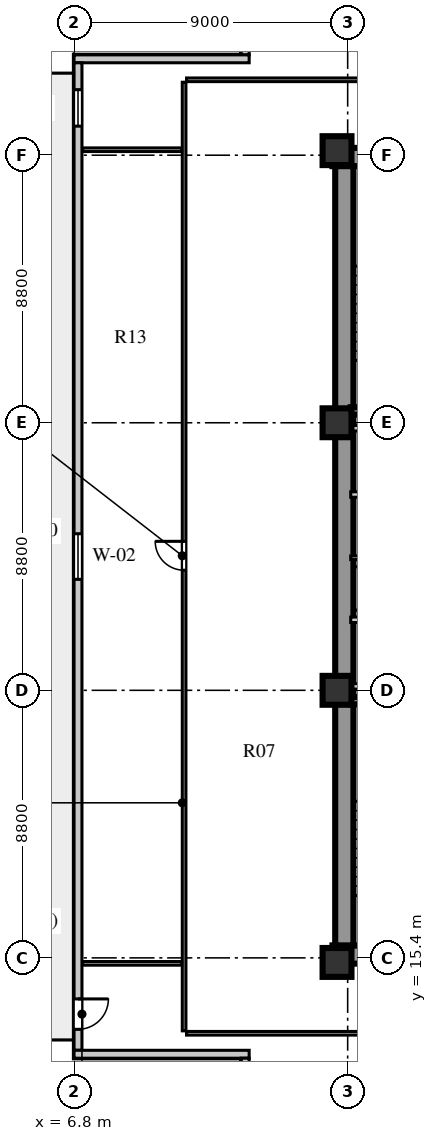
"""IFC4 building model, lengths in metres.
Left out: names, types, materials, properties, quantities, classifications, styles, units other than length and angle.
Written with IfcOpenShell. Run it as: python <this file> out.ifc"""

import sys

from ifc_helpers import new_model, si_unit, direction, frame, frame_2d, origin, origin_2d, place, context, subcontext, project, spatial, rectangle, extrude, element, fill, save


model = new_model("IFC4")
c1 = context("Model", 3, precision=1e-05, world=origin(), true_north=direction((0.0, 1.0)))
c2 = subcontext(c1, "Body", "Model", "MODEL_VIEW")
j1 = project(units=[si_unit("LENGTHUNIT", "METRE"), si_unit("PLANEANGLEUNIT", "RADIAN")], contexts=[c1])
p1 = place(None, origin())
s1 = spatial("IfcSite", under=j1, at=p1, CompositionType="ELEMENT")
p2 = place(p1, origin())
s2 = spatial("IfcBuilding", under=s1, at=p2, CompositionType="ELEMENT")
p3 = place(p2, frame((0.0, 0.0, 34.0)))
s3 = spatial("IfcBuildingStorey", under=s2, at=p3, CompositionType="ELEMENT", Elevation=34.0)
for number, where, z_axis, x_axis in (
    (1, (15.3, 15.51, 0.0), (0.0, 0.0, 1.0), (1.0, 0.0, 0.0)),
    (2, (15.3, 41.74, 0.0), (0.0, 0.0, 1.0), (1.0, 0.0, 0.0)),
):
    element("IfcWall", number, at=place(p3, frame(where, z_axis=z_axis, x_axis=x_axis)), inside=s3, PredefinedType="SHEAR", context=c2, shape_type="SweptSolid", body=[
        extrude(rectangle(XDim=9.88, YDim=0.6, at=frame_2d((4.94, 0.0))), origin(), (0.0, 0.0, 1.0), 3.72),
    ])
p4 = place(p3, frame((15.69, 15.81, 0.0), z_axis=(0.0, 0.0, 1.0), x_axis=(0.0, 1.0, 0.0)))
e3 = element("IfcWall", 3, at=p4, inside=s3, PredefinedType="SHEAR", context=c2, shape_type="SweptSolid", body=[
    extrude(rectangle(XDim=25.63, YDim=0.6, at=frame_2d((12.815, 0.0))), origin(), (0.0, 0.0, 1.0), 3.72),
])
for number, where, z_axis, x_axis in (
    (4, (15.45, 15.25, 0.0), (0.0, 0.0, 1.0), (1.0, 0.0, 0.0)),
    (5, (15.45, 24.2, 0.0), (0.0, 0.0, 1.0), (1.0, 0.0, 0.0)),
    (6, (15.45, 33.0, 0.0), (0.0, 0.0, 1.0), (1.0, 0.0, 0.0)),
    (7, (15.45, 41.95, 0.0), (0.0, 0.0, 1.0), (1.0, 0.0, 0.0)),
):
    element("IfcColumn", number, at=place(p3, frame(where, z_axis=z_axis, x_axis=x_axis)), inside=s3, PredefinedType="COLUMN", context=c2, shape_type="SweptSolid", body=[
        extrude(rectangle(XDim=0.95, YDim=0.95, at=origin_2d()), origin(), (0.0, 0.0, 1.0), 3.72),
    ])
p5 = place(p3, frame((12.43, 50.34, 0.0), z_axis=(0.0, 0.0, 1.0), x_axis=(0.0, -1.0, 0.0)))
e8 = element("IfcWall", 8, at=p5, inside=s3, PredefinedType="SOLIDWALL", context=c2, shape_type="SweptSolid", body=[
    extrude(rectangle(XDim=5.24, YDim=0.26, at=frame_2d((2.62, 0.0))), origin(), (0.0, 0.0, 1.0), 3.72),
])
p6 = place(p3, frame((12.56, 44.97, 0.0), z_axis=(0.0, 0.0, 1.0), x_axis=(-1.0, 0.0, 0.0)))
e9 = element("IfcWall", 9, at=p6, inside=s3, PredefinedType="SOLIDWALL", context=c2, shape_type="SweptSolid", body=[
    extrude(rectangle(XDim=5.76, YDim=0.26, at=frame_2d((2.88, 0.0))), origin(), (0.0, 0.0, 1.0), 3.72),
])
p7 = place(p3, frame((6.93, 44.84, 0.0), z_axis=(0.0, 0.0, 1.0), x_axis=(0.0, -1.0, 0.0)))
e10 = element("IfcWall", 10, at=p7, inside=s3, PredefinedType="SOLIDWALL", context=c2, shape_type="SweptSolid", body=[
    extrude(rectangle(XDim=32.48, YDim=0.26, at=frame_2d((16.24, 0.0))), origin(), (0.0, 0.0, 1.0), 3.72),
])
p8 = place(p7, frame((30.79, 0.0, 0.0)))
e11 = element("IfcOpeningElement", 11, at=p8, cuts=e10, PredefinedType="OPENING", context=c2, shape_type="SweptSolid", body=[
    extrude(rectangle(XDim=1.0, YDim=2.05, at=frame_2d((0.5, 1.025))), frame((0.0, 0.14, 0.0), z_axis=(0.0, -1.0, 0.0), x_axis=(1.0, 0.0, 0.0)), (0.0, 0.0, 1.0), 0.28),
])
p9 = place(p7, frame((15.49, 0.0, 0.8)))
e12 = element("IfcOpeningElement", 12, at=p9, cuts=e10, PredefinedType="OPENING", context=c2, shape_type="SweptSolid", body=[
    extrude(rectangle(XDim=1.5, YDim=2.0, at=frame_2d((0.75, 1.0))), frame((0.0, 0.14, 0.0), z_axis=(0.0, -1.0, 0.0), x_axis=(1.0, 0.0, 0.0)), (0.0, 0.0, 1.0), 0.28),
])
p10 = place(p7, frame((0.885, 0.0, 0.8)))
e13 = element("IfcOpeningElement", 13, at=p10, cuts=e10, PredefinedType="OPENING", context=c2, shape_type="SweptSolid", body=[
    extrude(rectangle(XDim=1.2, YDim=1.75, at=frame_2d((0.6, 0.875))), frame((0.0, 0.14, 0.0), z_axis=(0.0, -1.0, 0.0), x_axis=(1.0, 0.0, 0.0)), (0.0, 0.0, 1.0), 0.28),
])
p11 = place(p3, frame((6.8, 12.23, 0.0), z_axis=(0.0, 0.0, 1.0), x_axis=(1.0, 0.0, 0.0)))
e14 = element("IfcWall", 14, at=p11, inside=s3, PredefinedType="SOLIDWALL", context=c2, shape_type="SweptSolid", body=[
    extrude(rectangle(XDim=5.76, YDim=0.26, at=frame_2d((2.88, 0.0))), origin(), (0.0, 0.0, 1.0), 3.72),
])
p12 = place(p3, frame((12.43, 12.1, 0.0), z_axis=(0.0, 0.0, 1.0), x_axis=(0.0, -1.0, 0.0)))
e15 = element("IfcWall", 15, at=p12, inside=s3, PredefinedType="SOLIDWALL", context=c2, shape_type="SweptSolid", body=[
    extrude(rectangle(XDim=5.24, YDim=0.26, at=frame_2d((2.62, 0.0))), origin(), (0.0, 0.0, 1.0), 3.72),
])
p13 = place(p3, frame((15.9, 23.86, 0.0), z_axis=(0.0, 0.0, 1.0), x_axis=(1.0, 0.0, 0.0)))
e16 = element("IfcWall", 16, at=p13, inside=s3, PredefinedType="SHEAR", context=c2, shape_type="SweptSolid", body=[
    extrude(rectangle(XDim=3.52, YDim=0.24, at=frame_2d((1.76, 0.0))), origin(), (0.0, 0.0, 1.0), 4.0),
])
p14 = place(p3, frame((15.9, 26.52, 0.0), z_axis=(0.0, 0.0, 1.0), x_axis=(1.0, 0.0, 0.0)))
e17 = element("IfcWall", 17, at=p14, inside=s3, PredefinedType="SOLIDWALL", context=c2, shape_type="SweptSolid", body=[
    extrude(rectangle(XDim=8.68, YDim=0.18, at=frame_2d((4.34, 0.0))), origin(), (0.0, 0.0, 1.0), 3.72),
])
p15 = place(p14, frame((1.76, 0.0, 0.0)))
e18 = element("IfcOpeningElement", 18, at=p15, cuts=e17, PredefinedType="OPENING", context=c2, shape_type="SweptSolid", body=[
    extrude(rectangle(XDim=1.0, YDim=2.1, at=frame_2d((0.5, 1.05))), frame((0.0, 0.1, 0.0), z_axis=(0.0, -1.0, 0.0), x_axis=(1.0, 0.0, 0.0)), (0.0, 0.0, 1.0), 0.2),
])
p16 = place(p14, frame((3.6, 0.0, 0.0)))
e19 = element("IfcOpeningElement", 19, at=p16, cuts=e17, PredefinedType="OPENING", context=c2, shape_type="SweptSolid", body=[
    extrude(rectangle(XDim=1.0, YDim=2.1, at=frame_2d((0.5, 1.05))), frame((0.0, 0.1, 0.0), z_axis=(0.0, -1.0, 0.0), x_axis=(1.0, 0.0, 0.0)), (0.0, 0.0, 1.0), 0.2),
])
p17 = place(p14, frame((5.44, 0.0, 0.0)))
e20 = element("IfcOpeningElement", 20, at=p17, cuts=e17, PredefinedType="OPENING", context=c2, shape_type="SweptSolid", body=[
    extrude(rectangle(XDim=1.0, YDim=2.1, at=frame_2d((0.5, 1.05))), frame((0.0, 0.1, 0.0), z_axis=(0.0, -1.0, 0.0), x_axis=(1.0, 0.0, 0.0)), (0.0, 0.0, 1.0), 0.2),
])
p18 = place(p14, frame((7.28, 0.0, 0.0)))
e21 = element("IfcOpeningElement", 21, at=p18, cuts=e17, PredefinedType="OPENING", context=c2, shape_type="SweptSolid", body=[
    extrude(rectangle(XDim=1.0, YDim=2.1, at=frame_2d((0.5, 1.05))), frame((0.0, 0.1, 0.0), z_axis=(0.0, -1.0, 0.0), x_axis=(1.0, 0.0, 0.0)), (0.0, 0.0, 1.0), 0.2),
])
p19 = place(p3, frame((15.9, 24.33, 0.0), z_axis=(0.0, 0.0, 1.0), x_axis=(1.0, 0.0, 0.0)))
e22 = element("IfcWall", 22, at=p19, inside=s3, PredefinedType="SOLIDWALL", context=c2, shape_type="SweptSolid", body=[
    extrude(rectangle(XDim=8.68, YDim=0.18, at=frame_2d((4.34, 0.0))), origin(), (0.0, 0.0, 1.0), 3.02),
])
p20 = place(p3, frame((15.9, 28.56, 0.0), z_axis=(0.0, 0.0, 1.0), x_axis=(1.0, 0.0, 0.0)))
e23 = element("IfcWall", 23, at=p20, inside=s3, PredefinedType="PARTITIONING", context=c2, shape_type="SweptSolid", body=[
    extrude(rectangle(XDim=1.2, YDim=0.12, at=frame_2d((0.6, 0.0))), origin(), (0.0, 0.0, 1.0), 3.72),
])
p21 = place(p3, frame((15.9, 30.64, 0.0), z_axis=(0.0, 0.0, 1.0), x_axis=(1.0, 0.0, 0.0)))
e24 = element("IfcWall", 24, at=p21, inside=s3, PredefinedType="SOLIDWALL", context=c2, shape_type="SweptSolid", body=[
    extrude(rectangle(XDim=8.68, YDim=0.18, at=frame_2d((4.34, 0.0))), origin(), (0.0, 0.0, 1.0), 3.72),
])
p22 = place(p21, frame((1.76, 0.0, 0.0)))
e25 = element("IfcOpeningElement", 25, at=p22, cuts=e24, PredefinedType="OPENING", context=c2, shape_type="SweptSolid", body=[
    extrude(rectangle(XDim=1.0, YDim=2.1, at=frame_2d((0.5, 1.05))), frame((0.0, 0.1, 0.0), z_axis=(0.0, -1.0, 0.0), x_axis=(1.0, 0.0, 0.0)), (0.0, 0.0, 1.0), 0.2),
])
p23 = place(p21, frame((3.6, 0.0, 0.0)))
e26 = element("IfcOpeningElement", 26, at=p23, cuts=e24, PredefinedType="OPENING", context=c2, shape_type="SweptSolid", body=[
    extrude(rectangle(XDim=1.0, YDim=2.1, at=frame_2d((0.5, 1.05))), frame((0.0, 0.1, 0.0), z_axis=(0.0, -1.0, 0.0), x_axis=(1.0, 0.0, 0.0)), (0.0, 0.0, 1.0), 0.2),
])
p24 = place(p21, frame((5.44, 0.0, 0.0)))
e27 = element("IfcOpeningElement", 27, at=p24, cuts=e24, PredefinedType="OPENING", context=c2, shape_type="SweptSolid", body=[
    extrude(rectangle(XDim=1.0, YDim=2.1, at=frame_2d((0.5, 1.05))), frame((0.0, 0.1, 0.0), z_axis=(0.0, -1.0, 0.0), x_axis=(1.0, 0.0, 0.0)), (0.0, 0.0, 1.0), 0.2),
])
p25 = place(p21, frame((7.28, 0.0, 0.0)))
e28 = element("IfcOpeningElement", 28, at=p25, cuts=e24, PredefinedType="OPENING", context=c2, shape_type="SweptSolid", body=[
    extrude(rectangle(XDim=1.0, YDim=2.1, at=frame_2d((0.5, 1.05))), frame((0.0, 0.1, 0.0), z_axis=(0.0, -1.0, 0.0), x_axis=(1.0, 0.0, 0.0)), (0.0, 0.0, 1.0), 0.2),
])
p26 = place(p3, frame((15.9, 32.82, 0.0), z_axis=(0.0, 0.0, 1.0), x_axis=(1.0, 0.0, 0.0)))
e29 = element("IfcWall", 29, at=p26, inside=s3, PredefinedType="SOLIDWALL", context=c2, shape_type="SweptSolid", body=[
    extrude(rectangle(XDim=8.68, YDim=0.18, at=frame_2d((4.34, 0.0))), origin(), (0.0, 0.0, 1.0), 3.02),
])
p27 = place(p3, frame((15.9, 33.39, 0.0), z_axis=(0.0, 0.0, 1.0), x_axis=(1.0, 0.0, 0.0)))
e30 = element("IfcWall", 30, at=p27, inside=s3, PredefinedType="SHEAR", context=c2, shape_type="SweptSolid", body=[
    extrude(rectangle(XDim=3.52, YDim=0.24, at=frame_2d((1.76, 0.0))), origin(), (0.0, 0.0, 1.0), 4.0),
])
p28 = place(p3, frame((10.42, 13.0, 0.0), z_axis=(0.0, 0.0, 1.0), x_axis=(0.0, 1.0, 0.0)))
e31 = element("IfcWall", 31, at=p28, inside=s3, PredefinedType="PARTITIONING", context=c2, shape_type="SweptSolid", body=[
    extrude(rectangle(XDim=31.2, YDim=0.12, at=frame_2d((15.6, 0.0))), origin(), (0.0, 0.0, 1.0), 3.72),
])
p29 = place(p28, frame((15.15, 0.0, 0.0)))
e32 = element("IfcOpeningElement", 32, at=p29, cuts=e31, PredefinedType="OPENING", context=c2, shape_type="SweptSolid", body=[
    extrude(rectangle(XDim=0.95, YDim=2.08, at=frame_2d((0.475, 1.04))), frame((0.0, 0.07, 0.0), z_axis=(0.0, -1.0, 0.0), x_axis=(1.0, 0.0, 0.0)), (0.0, 0.0, 1.0), 0.14),
])
for number, where, z_axis, x_axis in (
    (33, (7.08, 15.22, 0.0), (0.0, 0.0, 1.0), (1.0, 0.0, 0.0)),
    (34, (7.08, 41.98, 0.0), (0.0, 0.0, 1.0), (1.0, 0.0, 0.0)),
):
    element("IfcWall", number, at=place(p3, frame(where, z_axis=z_axis, x_axis=x_axis)), inside=s3, PredefinedType="PARTITIONING", context=c2, shape_type="SweptSolid", body=[
        extrude(rectangle(XDim=3.26, YDim=0.12, at=frame_2d((1.63, 0.0))), origin(), (0.0, 0.0, 1.0), 3.22),
    ])
p30 = place(p3, frame((10.5, 12.92, 0.0), z_axis=(0.0, 0.0, 1.0), x_axis=(1.0, 0.0, 0.0)))
e35 = element("IfcWall", 35, at=p30, inside=s3, PredefinedType="PARTITIONING", context=c2, shape_type="SweptSolid", body=[
    extrude(rectangle(XDim=14.7, YDim=0.12, at=frame_2d((7.35, 0.0))), origin(), (0.0, 0.0, 1.0), 3.72),
])
p31 = place(p30, frame((6.2, 0.0, 0.0)))
e36 = element("IfcOpeningElement", 36, at=p31, cuts=e35, PredefinedType="OPENING", context=c2, shape_type="SweptSolid", body=[
    extrude(rectangle(XDim=1.0, YDim=2.08, at=frame_2d((0.5, 1.04))), frame((0.0, 0.07, 0.0), z_axis=(0.0, -1.0, 0.0), x_axis=(1.0, 0.0, 0.0)), (0.0, 0.0, 1.0), 0.14),
])
p32 = place(p3, frame((10.5, 44.28, 0.0), z_axis=(0.0, 0.0, 1.0), x_axis=(1.0, 0.0, 0.0)))
e37 = element("IfcWall", 37, at=p32, inside=s3, PredefinedType="PARTITIONING", context=c2, shape_type="SweptSolid", body=[
    extrude(rectangle(XDim=14.7, YDim=0.12, at=frame_2d((7.35, 0.0))), origin(), (0.0, 0.0, 1.0), 3.72),
])
p33 = place(p32, frame((6.2, 0.0, 0.0)))
e38 = element("IfcOpeningElement", 38, at=p33, cuts=e37, PredefinedType="OPENING", context=c2, shape_type="SweptSolid", body=[
    extrude(rectangle(XDim=1.0, YDim=2.08, at=frame_2d((0.5, 1.04))), frame((0.0, 0.07, 0.0), z_axis=(0.0, -1.0, 0.0), x_axis=(1.0, 0.0, 0.0)), (0.0, 0.0, 1.0), 0.14),
])
p34 = place(p8, frame((1.0, 0.0, 0.0), z_axis=(0.0, 0.0, 1.0), x_axis=(-1.0, 0.0, 0.0)))
e39 = element("IfcDoor", 39, at=p34, inside=s3, OperationType="SINGLE_SWING_RIGHT", PredefinedType="DOOR", context=c2, shape_type="SweptSolid", body=[
    extrude(rectangle(XDim=1.0, YDim=2.05, at=frame_2d((0.5, 1.025))), frame((0.0, 0.025, 0.0), z_axis=(0.0, -1.0, 0.0), x_axis=(1.0, 0.0, 0.0)), (0.0, 0.0, 1.0), 0.05),
])
fill(e11, e39)
p35 = place(p9, origin())
e40 = element("IfcWindow", 40, at=p35, inside=s3, PartitioningType="SINGLE_PANEL", PredefinedType="WINDOW", context=c2, shape_type="SweptSolid", body=[
    extrude(rectangle(XDim=1.5, YDim=2.0, at=frame_2d((0.75, 1.0))), frame((0.0, 0.03, 0.0), z_axis=(0.0, -1.0, 0.0), x_axis=(1.0, 0.0, 0.0)), (0.0, 0.0, 1.0), 0.06),
])
fill(e12, e40)
p36 = place(p10, origin())
e41 = element("IfcWindow", 41, at=p36, inside=s3, PartitioningType="SINGLE_PANEL", PredefinedType="WINDOW", context=c2, shape_type="SweptSolid", body=[
    extrude(rectangle(XDim=1.2, YDim=1.75, at=frame_2d((0.6, 0.875))), frame((0.0, 0.03, 0.0), z_axis=(0.0, -1.0, 0.0), x_axis=(1.0, 0.0, 0.0)), (0.0, 0.0, 1.0), 0.06),
])
fill(e13, e41)
p37 = place(p29, frame((0.95, 0.0, 0.0), z_axis=(0.0, 0.0, 1.0), x_axis=(-1.0, 0.0, 0.0)))
e42 = element("IfcDoor", 42, at=p37, inside=s3, OperationType="SINGLE_SWING_LEFT", PredefinedType="DOOR", context=c2, shape_type="SweptSolid", body=[
    extrude(rectangle(XDim=0.95, YDim=2.08, at=frame_2d((0.475, 1.04))), frame((0.0, 0.025, 0.0), z_axis=(0.0, -1.0, 0.0), x_axis=(1.0, 0.0, 0.0)), (0.0, 0.0, 1.0), 0.05),
])
fill(e32, e42)
save(model, sys.argv[1])
